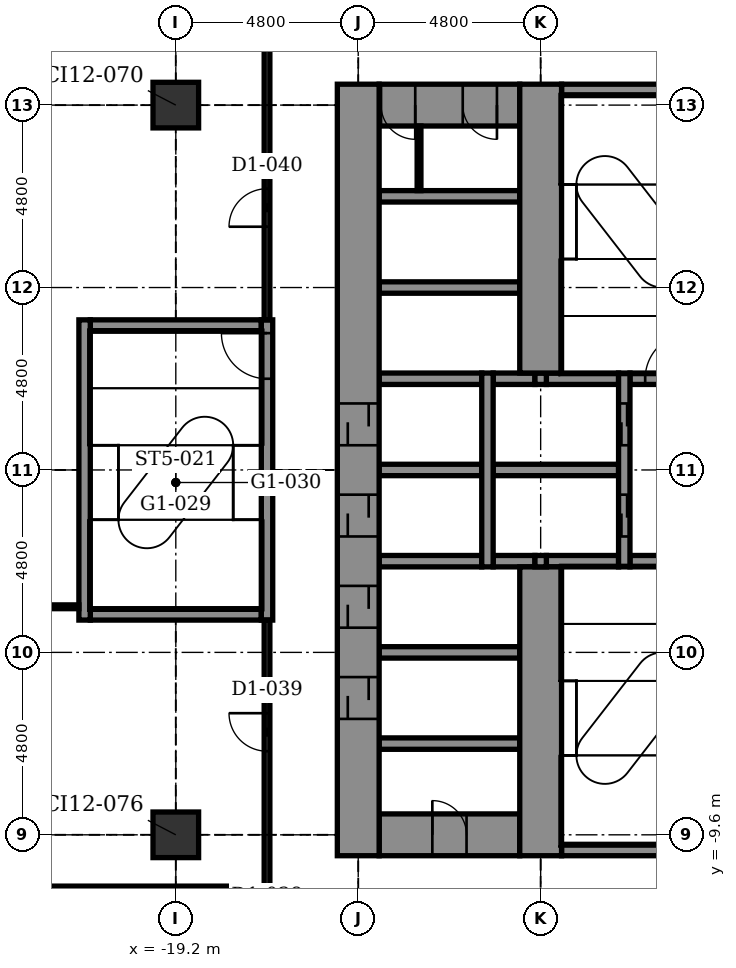
"""IFC4 building model, lengths in metres.
Left out: names, types, materials, properties, quantities, classifications, styles, units other than length and angle.
Written with IfcOpenShell. Run it as: python <this file> out.ifc"""

import sys

from ifc_helpers import new_model, si_unit, direction, frame, frame_2d, origin, origin_2d, place, context, subcontext, project, spatial, rectangle, extrude, element, fill, save


model = new_model("IFC4")
c1 = context("Model", 3, precision=1e-05, world=origin(), true_north=direction((0.0, 1.0)))
c2 = subcontext(c1, "Body", "Model", "MODEL_VIEW")
j1 = project(units=[si_unit("LENGTHUNIT", "METRE"), si_unit("PLANEANGLEUNIT", "RADIAN")], contexts=[c1])
p1 = place(None, origin())
s1 = spatial("IfcSite", under=j1, at=p1, CompositionType="ELEMENT")
p2 = place(p1, origin())
s2 = spatial("IfcBuilding", under=s1, at=p2, CompositionType="ELEMENT")
p3 = place(p2, frame((0.0, 0.0, 12.4)))
s3 = spatial("IfcBuildingStorey", under=s2, at=p3, CompositionType="ELEMENT", Elevation=12.4)
for number, where, z_axis, x_axis in (
    (1, (-19.2, -9.6, -0.3), (0.0, 0.0, 1.0), (1.0, 0.0, 0.0)),
    (2, (-19.2, 9.6, -0.3), (0.0, 0.0, 1.0), (1.0, 0.0, 0.0)),
):
    element("IfcColumn", number, at=place(p3, frame(where, z_axis=z_axis, x_axis=x_axis)), inside=s3, PredefinedType="COLUMN", context=c2, shape_type="SweptSolid", body=[
        extrude(rectangle(XDim=1.2, YDim=1.2, at=origin_2d()), origin(), (0.0, 0.0, 1.0), 5.05),
    ])
p4 = place(p3, frame((-9.05, -10.0, -0.3), z_axis=(0.0, 0.0, 1.0), x_axis=(1.0, 0.0, 0.0)))
e3 = element("IfcWall", 3, at=p4, inside=s3, PredefinedType="STANDARD", context=c2, shape_type="SweptSolid", body=[
    extrude(rectangle(XDim=3.8, YDim=0.3, at=frame_2d((1.9, 0.0))), origin(), (0.0, 0.0, 1.0), 5.05),
])
p5 = place(p3, frame((-13.85, -9.6, -0.3), z_axis=(0.0, 0.0, 1.0), x_axis=(1.0, 0.0, 0.0)))
e4 = element("IfcWall", 4, at=p5, inside=s3, PredefinedType="SHEAR", context=c2, shape_type="SweptSolid", body=[
    extrude(rectangle(XDim=3.7, YDim=1.1, at=frame_2d((1.85, 0.0))), origin(), (0.0, 0.0, 1.0), 5.05),
])
p6 = place(p5, frame((1.4, 0.0, 0.3)))
e5 = element("IfcOpeningElement", 5, at=p6, cuts=e4, PredefinedType="OPENING", context=c2, shape_type="SweptSolid", body=[
    extrude(rectangle(XDim=0.9, YDim=2.1, at=frame_2d((0.45, 1.05))), frame((0.0, 0.56, 0.0), z_axis=(0.0, -1.0, 0.0), x_axis=(1.0, 0.0, 0.0)), (0.0, 0.0, 1.0), 1.12),
])
for number, where, z_axis, x_axis in (
    (6, (-13.85, -7.2, -0.3), (0.0, 0.0, 1.0), (1.0, 0.0, 0.0)),
    (7, (-13.85, -4.8, -0.3), (0.0, 0.0, 1.0), (1.0, 0.0, 0.0)),
):
    element("IfcWall", number, at=place(p3, frame(where, z_axis=z_axis, x_axis=x_axis)), inside=s3, PredefinedType="STANDARD", context=c2, shape_type="SweptSolid", body=[
        extrude(rectangle(XDim=3.7, YDim=0.3, at=frame_2d((1.85, 0.0))), origin(), (0.0, 0.0, 1.0), 5.05),
    ])
p7 = place(p3, frame((-21.45, -3.8, -0.3), z_axis=(0.0, 0.0, 1.0), x_axis=(1.0, 0.0, 0.0)))
e8 = element("IfcWall", 8, at=p7, inside=s3, PredefinedType="STANDARD", context=c2, shape_type="SweptSolid", body=[
    extrude(rectangle(XDim=4.5, YDim=0.3, at=frame_2d((2.25, 0.0))), origin(), (0.0, 0.0, 1.0), 5.05),
])
p8 = place(p3, frame((-13.85, -2.4, -0.3), z_axis=(0.0, 0.0, 1.0), x_axis=(1.0, 0.0, 0.0)))
e9 = element("IfcWall", 9, at=p8, inside=s3, PredefinedType="STANDARD", context=c2, shape_type="SweptSolid", body=[
    extrude(rectangle(XDim=2.7, YDim=0.3, at=frame_2d((1.35, 0.0))), origin(), (0.0, 0.0, 1.0), 5.05),
])
p9 = place(p3, frame((-10.85, -2.4, -0.3), z_axis=(0.0, 0.0, 1.0), x_axis=(1.0, 0.0, 0.0)))
e10 = element("IfcWall", 10, at=p9, inside=s3, PredefinedType="STANDARD", context=c2, shape_type="SweptSolid", body=[
    extrude(rectangle(XDim=1.1, YDim=0.3, at=frame_2d((0.55, 0.0))), origin(), (0.0, 0.0, 1.0), 5.05),
])
p10 = place(p3, frame((-9.45, -2.4, -0.3), z_axis=(0.0, 0.0, 1.0), x_axis=(1.0, 0.0, 0.0)))
e11 = element("IfcWall", 11, at=p10, inside=s3, PredefinedType="STANDARD", context=c2, shape_type="SweptSolid", body=[
    extrude(rectangle(XDim=1.9, YDim=0.3, at=frame_2d((0.95, 0.0))), origin(), (0.0, 0.0, 1.0), 5.05),
])
p11 = place(p3, frame((-7.25, -2.4, -0.3), z_axis=(0.0, 0.0, 1.0), x_axis=(1.0, 0.0, 0.0)))
e12 = element("IfcWall", 12, at=p11, inside=s3, PredefinedType="STANDARD", context=c2, shape_type="SweptSolid", body=[
    extrude(rectangle(XDim=2.0, YDim=0.3, at=frame_2d((1.0, 0.0))), origin(), (0.0, 0.0, 1.0), 5.05),
])
p12 = place(p3, frame((-13.85, 0.0, -0.3), z_axis=(0.0, 0.0, 1.0), x_axis=(1.0, 0.0, 0.0)))
e13 = element("IfcWall", 13, at=p12, inside=s3, PredefinedType="STANDARD", context=c2, shape_type="SweptSolid", body=[
    extrude(rectangle(XDim=2.7, YDim=0.3, at=frame_2d((1.35, 0.0))), origin(), (0.0, 0.0, 1.0), 5.05),
])
p13 = place(p3, frame((-10.85, 0.0, -0.3), z_axis=(0.0, 0.0, 1.0), x_axis=(1.0, 0.0, 0.0)))
e14 = element("IfcWall", 14, at=p13, inside=s3, PredefinedType="STANDARD", context=c2, shape_type="SweptSolid", body=[
    extrude(rectangle(XDim=3.3, YDim=0.3, at=frame_2d((1.65, 0.0))), origin(), (0.0, 0.0, 1.0), 5.05),
])
p14 = place(p3, frame((-13.85, 2.4, -0.3), z_axis=(0.0, 0.0, 1.0), x_axis=(1.0, 0.0, 0.0)))
e15 = element("IfcWall", 15, at=p14, inside=s3, PredefinedType="STANDARD", context=c2, shape_type="SweptSolid", body=[
    extrude(rectangle(XDim=2.7, YDim=0.3, at=frame_2d((1.35, 0.0))), origin(), (0.0, 0.0, 1.0), 5.05),
])
p15 = place(p3, frame((-10.85, 2.4, -0.3), z_axis=(0.0, 0.0, 1.0), x_axis=(1.0, 0.0, 0.0)))
e16 = element("IfcWall", 16, at=p15, inside=s3, PredefinedType="STANDARD", context=c2, shape_type="SweptSolid", body=[
    extrude(rectangle(XDim=1.1, YDim=0.3, at=frame_2d((0.55, 0.0))), origin(), (0.0, 0.0, 1.0), 5.05),
])
p16 = place(p3, frame((-9.45, 2.4, -0.3), z_axis=(0.0, 0.0, 1.0), x_axis=(1.0, 0.0, 0.0)))
e17 = element("IfcWall", 17, at=p16, inside=s3, PredefinedType="STANDARD", context=c2, shape_type="SweptSolid", body=[
    extrude(rectangle(XDim=1.9, YDim=0.3, at=frame_2d((0.95, 0.0))), origin(), (0.0, 0.0, 1.0), 5.05),
])
p17 = place(p3, frame((-7.25, 2.4, -0.3), z_axis=(0.0, 0.0, 1.0), x_axis=(1.0, 0.0, 0.0)))
e18 = element("IfcWall", 18, at=p17, inside=s3, PredefinedType="STANDARD", context=c2, shape_type="SweptSolid", body=[
    extrude(rectangle(XDim=2.0, YDim=0.3, at=frame_2d((1.0, 0.0))), origin(), (0.0, 0.0, 1.0), 5.05),
])
p18 = place(p17, frame((0.4, 0.0, 0.3)))
e19 = element("IfcOpeningElement", 19, at=p18, cuts=e18, PredefinedType="OPENING", context=c2, shape_type="SweptSolid", body=[
    extrude(rectangle(XDim=1.2, YDim=2.1, at=frame_2d((0.6, 1.05))), frame((0.0, 0.16, 0.0), z_axis=(0.0, -1.0, 0.0), x_axis=(1.0, 0.0, 0.0)), (0.0, 0.0, 1.0), 0.32),
])
p19 = place(p3, frame((-21.45, 3.8, -0.3), z_axis=(0.0, 0.0, 1.0), x_axis=(1.0, 0.0, 0.0)))
e20 = element("IfcWall", 20, at=p19, inside=s3, PredefinedType="STANDARD", context=c2, shape_type="SweptSolid", body=[
    extrude(rectangle(XDim=4.5, YDim=0.3, at=frame_2d((2.25, 0.0))), origin(), (0.0, 0.0, 1.0), 5.05),
])
for number, where, z_axis, x_axis in (
    (21, (-13.85, 4.8, -0.3), (0.0, 0.0, 1.0), (1.0, 0.0, 0.0)),
    (22, (-13.85, 7.2, -0.3), (0.0, 0.0, 1.0), (1.0, 0.0, 0.0)),
):
    element("IfcWall", number, at=place(p3, frame(where, z_axis=z_axis, x_axis=x_axis)), inside=s3, PredefinedType="STANDARD", context=c2, shape_type="SweptSolid", body=[
        extrude(rectangle(XDim=3.7, YDim=0.3, at=frame_2d((1.85, 0.0))), origin(), (0.0, 0.0, 1.0), 5.05),
    ])
p20 = place(p3, frame((-13.85, 9.6, -0.3), z_axis=(0.0, 0.0, 1.0), x_axis=(1.0, 0.0, 0.0)))
e23 = element("IfcWall", 23, at=p20, inside=s3, PredefinedType="SHEAR", context=c2, shape_type="SweptSolid", body=[
    extrude(rectangle(XDim=3.7, YDim=1.1, at=frame_2d((1.85, 0.0))), origin(), (0.0, 0.0, 1.0), 5.05),
])
p21 = place(p20, frame((0.05, 0.0, 0.3)))
e24 = element("IfcOpeningElement", 24, at=p21, cuts=e23, PredefinedType="OPENING", context=c2, shape_type="SweptSolid", body=[
    extrude(rectangle(XDim=0.9, YDim=2.1, at=frame_2d((0.45, 1.05))), frame((0.0, 0.56, 0.0), z_axis=(0.0, -1.0, 0.0), x_axis=(1.0, 0.0, 0.0)), (0.0, 0.0, 1.0), 1.12),
])
p22 = place(p20, frame((2.2, 0.0, 0.3)))
e25 = element("IfcOpeningElement", 25, at=p22, cuts=e23, PredefinedType="OPENING", context=c2, shape_type="SweptSolid", body=[
    extrude(rectangle(XDim=0.9, YDim=2.1, at=frame_2d((0.45, 1.05))), frame((0.0, 0.56, 0.0), z_axis=(0.0, -1.0, 0.0), x_axis=(1.0, 0.0, 0.0)), (0.0, 0.0, 1.0), 1.12),
])
p23 = place(p3, frame((-9.05, 10.0, -0.3), z_axis=(0.0, 0.0, 1.0), x_axis=(1.0, 0.0, 0.0)))
e26 = element("IfcWall", 26, at=p23, inside=s3, PredefinedType="STANDARD", context=c2, shape_type="SweptSolid", body=[
    extrude(rectangle(XDim=3.8, YDim=0.3, at=frame_2d((1.9, 0.0))), origin(), (0.0, 0.0, 1.0), 5.05),
])
p24 = place(p3, frame((-21.6, -3.95, -0.3), z_axis=(0.0, 0.0, 1.0), x_axis=(0.0, 1.0, 0.0)))
e27 = element("IfcWall", 27, at=p24, inside=s3, PredefinedType="STANDARD", context=c2, shape_type="SweptSolid", body=[
    extrude(rectangle(XDim=7.9, YDim=0.3, at=frame_2d((3.95, 0.0))), origin(), (0.0, 0.0, 1.0), 5.05),
])
p25 = place(p3, frame((-16.8, -3.95, -0.3), z_axis=(0.0, 0.0, 1.0), x_axis=(0.0, 1.0, 0.0)))
e28 = element("IfcWall", 28, at=p25, inside=s3, PredefinedType="STANDARD", context=c2, shape_type="SweptSolid", body=[
    extrude(rectangle(XDim=7.9, YDim=0.3, at=frame_2d((3.95, 0.0))), origin(), (0.0, 0.0, 1.0), 5.05),
])
p26 = place(p25, frame((6.35, 0.0, 0.3)))
e29 = element("IfcOpeningElement", 29, at=p26, cuts=e28, PredefinedType="OPENING", context=c2, shape_type="SweptSolid", body=[
    extrude(rectangle(XDim=1.2, YDim=2.1, at=frame_2d((0.6, 1.05))), frame((0.0, 0.16, 0.0), z_axis=(0.0, -1.0, 0.0), x_axis=(1.0, 0.0, 0.0)), (0.0, 0.0, 1.0), 0.32),
])
p27 = place(p3, frame((-14.4, -10.15, -0.3), z_axis=(0.0, 0.0, 1.0), x_axis=(0.0, 1.0, 0.0)))
e30 = element("IfcWall", 30, at=p27, inside=s3, PredefinedType="SHEAR", context=c2, shape_type="SweptSolid", body=[
    extrude(rectangle(XDim=20.3, YDim=1.1, at=frame_2d((10.15, 0.0))), origin(), (0.0, 0.0, 1.0), 5.05),
])
p28 = place(p27, frame((3.6, 0.0, 0.3)))
e31 = element("IfcOpeningElement", 31, at=p28, cuts=e30, PredefinedType="OPENING", context=c2, shape_type="SweptSolid", body=[
    extrude(rectangle(XDim=1.1, YDim=2.1, at=frame_2d((0.55, 1.05))), frame((0.0, 0.56, 0.0), z_axis=(0.0, -1.0, 0.0), x_axis=(1.0, 0.0, 0.0)), (0.0, 0.0, 1.0), 1.12),
])
p29 = place(p27, frame((6.0, 0.0, 0.3)))
e32 = element("IfcOpeningElement", 32, at=p29, cuts=e30, PredefinedType="OPENING", context=c2, shape_type="SweptSolid", body=[
    extrude(rectangle(XDim=1.1, YDim=2.1, at=frame_2d((0.55, 1.05))), frame((0.0, 0.56, 0.0), z_axis=(0.0, -1.0, 0.0), x_axis=(1.0, 0.0, 0.0)), (0.0, 0.0, 1.0), 1.12),
])
p30 = place(p27, frame((8.4, 0.0, 0.3)))
e33 = element("IfcOpeningElement", 33, at=p30, cuts=e30, PredefinedType="OPENING", context=c2, shape_type="SweptSolid", body=[
    extrude(rectangle(XDim=1.1, YDim=2.1, at=frame_2d((0.55, 1.05))), frame((0.0, 0.56, 0.0), z_axis=(0.0, -1.0, 0.0), x_axis=(1.0, 0.0, 0.0)), (0.0, 0.0, 1.0), 1.12),
])
p31 = place(p27, frame((10.8, 0.0, 0.3)))
e34 = element("IfcOpeningElement", 34, at=p31, cuts=e30, PredefinedType="OPENING", context=c2, shape_type="SweptSolid", body=[
    extrude(rectangle(XDim=1.1, YDim=2.1, at=frame_2d((0.55, 1.05))), frame((0.0, 0.56, 0.0), z_axis=(0.0, -1.0, 0.0), x_axis=(1.0, 0.0, 0.0)), (0.0, 0.0, 1.0), 1.12),
])
p32 = place(p3, frame((-11.0, -2.55, -0.3), z_axis=(0.0, 0.0, 1.0), x_axis=(0.0, 1.0, 0.0)))
e35 = element("IfcWall", 35, at=p32, inside=s3, PredefinedType="STANDARD", context=c2, shape_type="SweptSolid", body=[
    extrude(rectangle(XDim=5.1, YDim=0.3, at=frame_2d((2.55, 0.0))), origin(), (0.0, 0.0, 1.0), 5.05),
])
p33 = place(p3, frame((-9.6, -10.15, -0.3), z_axis=(0.0, 0.0, 1.0), x_axis=(0.0, 1.0, 0.0)))
e36 = element("IfcWall", 36, at=p33, inside=s3, PredefinedType="SHEAR", context=c2, shape_type="SweptSolid", body=[
    extrude(rectangle(XDim=7.6, YDim=1.1, at=frame_2d((3.8, 0.0))), origin(), (0.0, 0.0, 1.0), 5.05),
])
for number, where, z_axis, x_axis in (
    (37, (-9.6, -2.55, -0.3), (0.0, 0.0, 1.0), (0.0, 1.0, 0.0)),
    (38, (-9.6, 2.25, -0.3), (0.0, 0.0, 1.0), (0.0, 1.0, 0.0)),
):
    element("IfcWall", number, at=place(p3, frame(where, z_axis=z_axis, x_axis=x_axis)), inside=s3, PredefinedType="STANDARD", context=c2, shape_type="SweptSolid", body=[
        extrude(rectangle(XDim=0.3, YDim=0.3, at=frame_2d((0.15, 0.0))), origin(), (0.0, 0.0, 1.0), 5.05),
    ])
p34 = place(p3, frame((-9.6, 2.55, -0.3), z_axis=(0.0, 0.0, 1.0), x_axis=(0.0, 1.0, 0.0)))
e39 = element("IfcWall", 39, at=p34, inside=s3, PredefinedType="SHEAR", context=c2, shape_type="SweptSolid", body=[
    extrude(rectangle(XDim=7.6, YDim=1.1, at=frame_2d((3.8, 0.0))), origin(), (0.0, 0.0, 1.0), 5.05),
])
p35 = place(p3, frame((-7.4, -2.55, -0.3), z_axis=(0.0, 0.0, 1.0), x_axis=(0.0, 1.0, 0.0)))
e40 = element("IfcWall", 40, at=p35, inside=s3, PredefinedType="STANDARD", context=c2, shape_type="SweptSolid", body=[
    extrude(rectangle(XDim=5.1, YDim=0.3, at=frame_2d((2.55, 0.0))), origin(), (0.0, 0.0, 1.0), 5.05),
])
p36 = place(p35, frame((0.8, 0.0, 0.3)))
e41 = element("IfcOpeningElement", 41, at=p36, cuts=e40, PredefinedType="OPENING", context=c2, shape_type="SweptSolid", body=[
    extrude(rectangle(XDim=1.1, YDim=2.1, at=frame_2d((0.55, 1.05))), frame((0.0, 0.16, 0.0), z_axis=(0.0, -1.0, 0.0), x_axis=(1.0, 0.0, 0.0)), (0.0, 0.0, 1.0), 0.32),
])
p37 = place(p35, frame((3.2, 0.0, 0.3)))
e42 = element("IfcOpeningElement", 42, at=p37, cuts=e40, PredefinedType="OPENING", context=c2, shape_type="SweptSolid", body=[
    extrude(rectangle(XDim=1.1, YDim=2.1, at=frame_2d((0.55, 1.05))), frame((0.0, 0.16, 0.0), z_axis=(0.0, -1.0, 0.0), x_axis=(1.0, 0.0, 0.0)), (0.0, 0.0, 1.0), 0.32),
])
p38 = place(p3, frame((-12.8, 7.35, 0.0), z_axis=(0.0, 0.0, 1.0), x_axis=(0.0, 1.0, 0.0)))
e43 = element("IfcWall", 43, at=p38, inside=s3, PredefinedType="PARTITIONING", context=c2, shape_type="SweptSolid", body=[
    extrude(rectangle(XDim=1.7, YDim=0.1, at=frame_2d((0.85, 0.0))), origin(), (0.0, 0.0, 1.0), 4.7),
])
p39 = place(p3, frame((-16.8, -13.6, 0.0), z_axis=(0.0, 0.0, 1.0), x_axis=(0.0, 1.0, 0.0)))
e44 = element("IfcWall", 44, at=p39, inside=s3, PredefinedType="PARTITIONING", context=c2, shape_type="SweptSolid", body=[
    extrude(rectangle(XDim=9.65, YDim=0.15, at=frame_2d((4.825, 0.0))), origin(), (0.0, 0.0, 1.0), 4.7),
])
p40 = place(p39, frame((0.8, 0.0, 0.0)))
e45 = element("IfcOpeningElement", 45, at=p40, cuts=e44, PredefinedType="OPENING", context=c2, shape_type="SweptSolid", body=[
    extrude(rectangle(XDim=1.0, YDim=2.1, at=frame_2d((0.5, 1.05))), frame((0.0, 0.085, 0.0), z_axis=(0.0, -1.0, 0.0), x_axis=(1.0, 0.0, 0.0)), (0.0, 0.0, 1.0), 0.17),
])
p41 = place(p39, frame((6.2, 0.0, 0.0)))
e46 = element("IfcOpeningElement", 46, at=p41, cuts=e44, PredefinedType="OPENING", context=c2, shape_type="SweptSolid", body=[
    extrude(rectangle(XDim=1.0, YDim=2.1, at=frame_2d((0.5, 1.05))), frame((0.0, 0.085, 0.0), z_axis=(0.0, -1.0, 0.0), x_axis=(1.0, 0.0, 0.0)), (0.0, 0.0, 1.0), 0.17),
])
p42 = place(p3, frame((-16.8, 3.95, 0.0), z_axis=(0.0, 0.0, 1.0), x_axis=(0.0, 1.0, 0.0)))
e47 = element("IfcWall", 47, at=p42, inside=s3, PredefinedType="PARTITIONING", context=c2, shape_type="SweptSolid", body=[
    extrude(rectangle(XDim=10.85, YDim=0.15, at=frame_2d((5.425, 0.0))), origin(), (0.0, 0.0, 1.0), 4.7),
])
p43 = place(p42, frame((2.45, 0.0, 0.0)))
e48 = element("IfcOpeningElement", 48, at=p43, cuts=e47, PredefinedType="OPENING", context=c2, shape_type="SweptSolid", body=[
    extrude(rectangle(XDim=1.0, YDim=2.1, at=frame_2d((0.5, 1.05))), frame((0.0, 0.085, 0.0), z_axis=(0.0, -1.0, 0.0), x_axis=(1.0, 0.0, 0.0)), (0.0, 0.0, 1.0), 0.17),
])
p44 = place(p42, frame((8.95, 0.0, 0.0)))
e49 = element("IfcOpeningElement", 49, at=p44, cuts=e47, PredefinedType="OPENING", context=c2, shape_type="SweptSolid", body=[
    extrude(rectangle(XDim=1.0, YDim=2.1, at=frame_2d((0.5, 1.05))), frame((0.0, 0.085, 0.0), z_axis=(0.0, -1.0, 0.0), x_axis=(1.0, 0.0, 0.0)), (0.0, 0.0, 1.0), 0.17),
])
p45 = place(p3, frame((-41.51, -11.0, 0.0), z_axis=(0.0, 0.0, 1.0), x_axis=(1.0, 0.0, 0.0)))
e50 = element("IfcWall", 50, at=p45, inside=s3, PredefinedType="PARTITIONING", context=c2, shape_type="SweptSolid", body=[
    extrude(rectangle(XDim=24.71, YDim=0.1, at=frame_2d((12.355, 0.0))), origin(), (0.0, 0.0, 1.0), 4.7),
])
p46 = place(p3, frame((-44.738, -3.6, 0.0), z_axis=(0.0, 0.0, 1.0), x_axis=(1.0, 0.0, 0.0)))
e51 = element("IfcWall", 51, at=p46, inside=s3, PredefinedType="PARTITIONING", context=c2, shape_type="SweptSolid", body=[
    extrude(rectangle(XDim=22.988, YDim=0.1, at=frame_2d((11.494, 0.0))), origin(), (0.0, 0.0, 1.0), 4.7),
])
p47 = place(p41, origin())
e52 = element("IfcDoor", 52, at=p47, inside=s3, OperationType="SINGLE_SWING_RIGHT", PredefinedType="DOOR", context=c2, shape_type="SweptSolid", body=[
    extrude(rectangle(XDim=1.0, YDim=2.1, at=frame_2d((0.5, 1.05))), frame((0.0, 0.025, 0.0), z_axis=(0.0, -1.0, 0.0), x_axis=(1.0, 0.0, 0.0)), (0.0, 0.0, 1.0), 0.05),
])
fill(e46, e52)
p48 = place(p43, origin())
e53 = element("IfcDoor", 53, at=p48, inside=s3, OperationType="SINGLE_SWING_LEFT", PredefinedType="DOOR", context=c2, shape_type="SweptSolid", body=[
    extrude(rectangle(XDim=1.0, YDim=2.1, at=frame_2d((0.5, 1.05))), frame((0.0, 0.025, 0.0), z_axis=(0.0, -1.0, 0.0), x_axis=(1.0, 0.0, 0.0)), (0.0, 0.0, 1.0), 0.05),
])
fill(e48, e53)
p49 = place(p36, origin())
e54 = element("IfcDoor", 54, at=p49, inside=s3, OperationType="DOUBLE_DOOR_SLIDING", PredefinedType="DOOR", context=c2, shape_type="SweptSolid", body=[
    extrude(rectangle(XDim=1.1, YDim=2.1, at=frame_2d((0.55, 1.05))), frame((0.0, 0.025, 0.0), z_axis=(0.0, -1.0, 0.0), x_axis=(1.0, 0.0, 0.0)), (0.0, 0.0, 1.0), 0.05),
])
fill(e41, e54)
p50 = place(p37, origin())
e55 = element("IfcDoor", 55, at=p50, inside=s3, OperationType="DOUBLE_DOOR_SLIDING", PredefinedType="DOOR", context=c2, shape_type="SweptSolid", body=[
    extrude(rectangle(XDim=1.1, YDim=2.1, at=frame_2d((0.55, 1.05))), frame((0.0, 0.025, 0.0), z_axis=(0.0, -1.0, 0.0), x_axis=(1.0, 0.0, 0.0)), (0.0, 0.0, 1.0), 0.05),
])
fill(e42, e55)
p51 = place(p28, origin())
e56 = element("IfcDoor", 56, at=p51, inside=s3, OperationType="DOUBLE_DOOR_SLIDING", PredefinedType="DOOR", context=c2, shape_type="SweptSolid", body=[
    extrude(rectangle(XDim=1.1, YDim=2.1, at=frame_2d((0.55, 1.05))), frame((0.0, 0.025, 0.0), z_axis=(0.0, -1.0, 0.0), x_axis=(1.0, 0.0, 0.0)), (0.0, 0.0, 1.0), 0.05),
])
fill(e31, e56)
p52 = place(p29, origin())
e57 = element("IfcDoor", 57, at=p52, inside=s3, OperationType="DOUBLE_DOOR_SLIDING", PredefinedType="DOOR", context=c2, shape_type="SweptSolid", body=[
    extrude(rectangle(XDim=1.1, YDim=2.1, at=frame_2d((0.55, 1.05))), frame((0.0, 0.025, 0.0), z_axis=(0.0, -1.0, 0.0), x_axis=(1.0, 0.0, 0.0)), (0.0, 0.0, 1.0), 0.05),
])
fill(e32, e57)
p53 = place(p30, origin())
e58 = element("IfcDoor", 58, at=p53, inside=s3, OperationType="DOUBLE_DOOR_SLIDING", PredefinedType="DOOR", context=c2, shape_type="SweptSolid", body=[
    extrude(rectangle(XDim=1.1, YDim=2.1, at=frame_2d((0.55, 1.05))), frame((0.0, 0.025, 0.0), z_axis=(0.0, -1.0, 0.0), x_axis=(1.0, 0.0, 0.0)), (0.0, 0.0, 1.0), 0.05),
])
fill(e33, e58)
p54 = place(p31, origin())
e59 = element("IfcDoor", 59, at=p54, inside=s3, OperationType="DOUBLE_DOOR_SLIDING", PredefinedType="DOOR", context=c2, shape_type="SweptSolid", body=[
    extrude(rectangle(XDim=1.1, YDim=2.1, at=frame_2d((0.55, 1.05))), frame((0.0, 0.025, 0.0), z_axis=(0.0, -1.0, 0.0), x_axis=(1.0, 0.0, 0.0)), (0.0, 0.0, 1.0), 0.05),
])
fill(e34, e59)
p55 = place(p26, origin())
e60 = element("IfcDoor", 60, at=p55, inside=s3, OperationType="SINGLE_SWING_RIGHT", PredefinedType="DOOR", context=c2, shape_type="SweptSolid", body=[
    extrude(rectangle(XDim=1.2, YDim=2.1, at=frame_2d((0.6, 1.05))), frame((0.0, 0.025, 0.0), z_axis=(0.0, -1.0, 0.0), x_axis=(1.0, 0.0, 0.0)), (0.0, 0.0, 1.0), 0.05),
])
fill(e29, e60)
p56 = place(p6, origin())
e61 = element("IfcDoor", 61, at=p56, inside=s3, OperationType="SINGLE_SWING_LEFT", PredefinedType="DOOR", context=c2, shape_type="SweptSolid", body=[
    extrude(rectangle(XDim=0.9, YDim=2.1, at=frame_2d((0.45, 1.05))), frame((0.0, 0.025, 0.0), z_axis=(0.0, -1.0, 0.0), x_axis=(1.0, 0.0, 0.0)), (0.0, 0.0, 1.0), 0.05),
])
fill(e5, e61)
p57 = place(p21, frame((0.9, 0.0, 0.0), z_axis=(0.0, 0.0, 1.0), x_axis=(-1.0, 0.0, 0.0)))
e62 = element("IfcDoor", 62, at=p57, inside=s3, OperationType="SINGLE_SWING_RIGHT", PredefinedType="DOOR", context=c2, shape_type="SweptSolid", body=[
    extrude(rectangle(XDim=0.9, YDim=2.1, at=frame_2d((0.45, 1.05))), frame((0.0, 0.025, 0.0), z_axis=(0.0, -1.0, 0.0), x_axis=(1.0, 0.0, 0.0)), (0.0, 0.0, 1.0), 0.05),
])
fill(e24, e62)
p58 = place(p22, frame((0.9, 0.0, 0.0), z_axis=(0.0, 0.0, 1.0), x_axis=(-1.0, 0.0, 0.0)))
e63 = element("IfcDoor", 63, at=p58, inside=s3, OperationType="SINGLE_SWING_RIGHT", PredefinedType="DOOR", context=c2, shape_type="SweptSolid", body=[
    extrude(rectangle(XDim=0.9, YDim=2.1, at=frame_2d((0.45, 1.05))), frame((0.0, 0.025, 0.0), z_axis=(0.0, -1.0, 0.0), x_axis=(1.0, 0.0, 0.0)), (0.0, 0.0, 1.0), 0.05),
])
fill(e25, e63)
p59 = place(p18, origin())
e64 = element("IfcDoor", 64, at=p59, inside=s3, OperationType="SINGLE_SWING_RIGHT", PredefinedType="DOOR", context=c2, shape_type="SweptSolid", body=[
    extrude(rectangle(XDim=1.2, YDim=2.1, at=frame_2d((0.6, 1.05))), frame((0.0, 0.025, 0.0), z_axis=(0.0, -1.0, 0.0), x_axis=(1.0, 0.0, 0.0)), (0.0, 0.0, 1.0), 0.05),
])
fill(e19, e64)
save(model, sys.argv[1])
